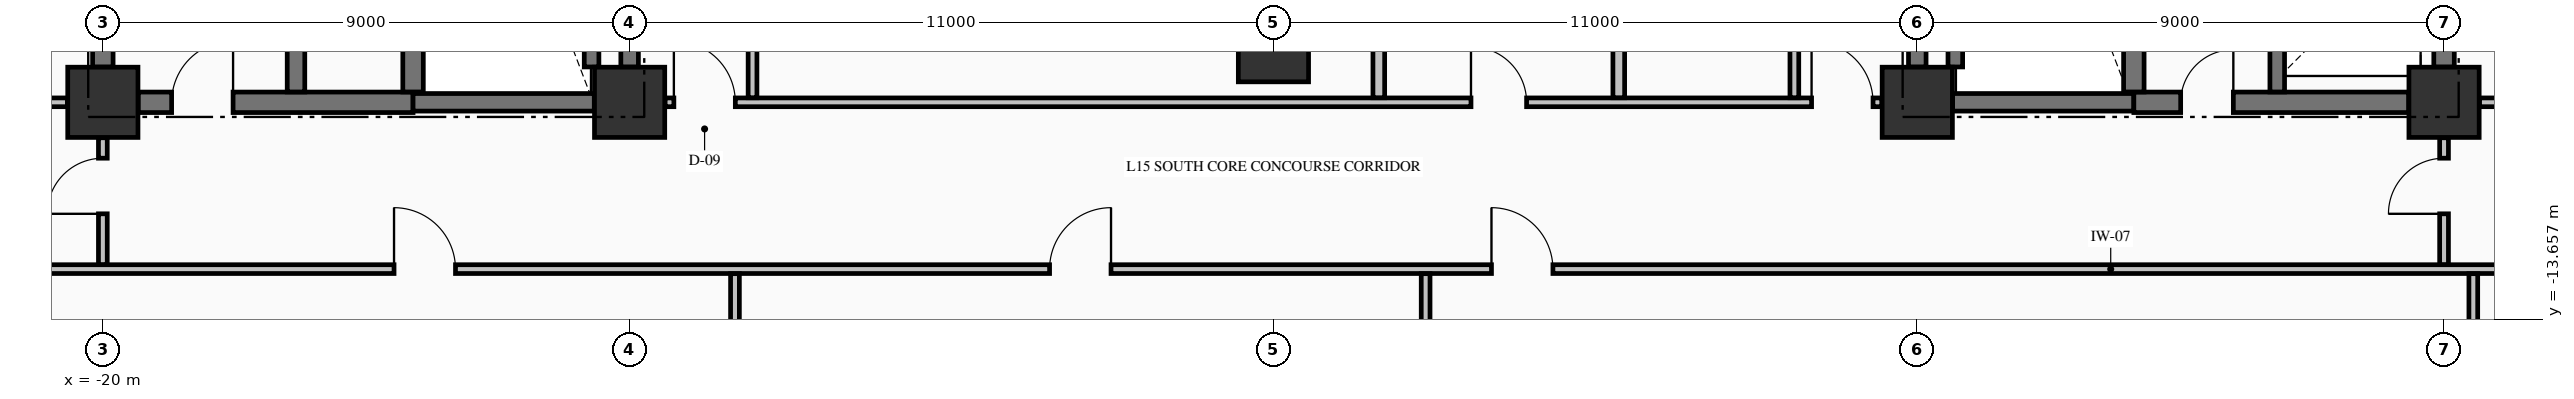
"""IFC4 building model, lengths in metres.
Left out: names, types, materials, properties, quantities, classifications, styles, units other than length and angle.
Written with IfcOpenShell. Run it as: python <this file> out.ifc"""

import sys

from ifc_helpers import new_model, si_unit, direction, frame, frame_2d, origin, origin_2d, place, context, subcontext, project, spatial, rectangle, extrude, element, fill, save


model = new_model("IFC4")
c1 = context("Model", 3, precision=1e-05, world=origin(), true_north=direction((0.0, 1.0)))
c2 = subcontext(c1, "Body", "Model", "MODEL_VIEW")
j1 = project(units=[si_unit("LENGTHUNIT", "METRE"), si_unit("PLANEANGLEUNIT", "RADIAN")], contexts=[c1])
p1 = place(None, origin())
s1 = spatial("IfcSite", under=j1, at=p1, CompositionType="ELEMENT")
p2 = place(p1, origin())
s2 = spatial("IfcBuilding", under=s1, at=p2, CompositionType="ELEMENT")
p3 = place(p2, frame((0.0, 0.0, 64.33)))
s3 = spatial("IfcBuildingStorey", under=s2, at=p3, CompositionType="ELEMENT", Elevation=64.33)
for number, where, z_axis, x_axis in (
    (1, (-20.0, -9.95, -0.25), (0.0, 0.0, 1.0), (1.0, 0.0, 0.0)),
    (2, (-11.0, -9.95, -0.25), (0.0, 0.0, 1.0), (1.0, 0.0, 0.0)),
    (3, (11.0, -9.95, -0.25), (0.0, 0.0, 1.0), (1.0, 0.0, 0.0)),
    (4, (20.0, -9.95, -0.25), (0.0, 0.0, 1.0), (1.0, 0.0, 0.0)),
    (5, (0.0, -9.0, -0.25), (0.0, 0.0, 1.0), (1.0, 0.0, 0.0)),
):
    element("IfcColumn", number, at=place(p3, frame(where, z_axis=z_axis, x_axis=x_axis)), inside=s3, PredefinedType="COLUMN", context=c2, shape_type="SweptSolid", body=[
        extrude(rectangle(XDim=1.2, YDim=1.2, at=origin_2d()), origin(), (0.0, 0.0, 1.0), 3.57),
    ])
p4 = place(p3, frame((-19.396, -9.95, 0.0), z_axis=(0.0, 0.0, 1.0), x_axis=(1.0, 0.0, 0.0)))
e6 = element("IfcWall", 6, at=p4, inside=s3, PredefinedType="SHEAR", context=c2, shape_type="SweptSolid", body=[
    extrude(rectangle(XDim=4.696, YDim=0.35, at=frame_2d((2.348, 0.0))), origin(), (0.0, 0.0, 1.0), 3.32),
])
p5 = place(p4, frame((0.571, 0.0, 0.0)))
e7 = element("IfcOpeningElement", 7, at=p5, cuts=e6, PredefinedType="OPENING", context=c2, shape_type="SweptSolid", body=[
    extrude(rectangle(XDim=1.05, YDim=2.15, at=frame_2d((0.525, 1.075))), frame((0.0, 0.185, 0.0), z_axis=(0.0, -1.0, 0.0), x_axis=(1.0, 0.0, 0.0)), (0.0, 0.0, 1.0), 0.37),
])
for number, where, z_axis, x_axis in (
    (8, (-14.7, -9.95, 0.0), (0.0, 0.0, 1.0), (1.0, 0.0, 0.0)),
    (9, (11.604, -9.95, 0.0), (0.0, 0.0, 1.0), (1.0, 0.0, 0.0)),
):
    element("IfcWall", number, at=place(p3, frame(where, z_axis=z_axis, x_axis=x_axis)), inside=s3, PredefinedType="SHEAR", context=c2, shape_type="SweptSolid", body=[
        extrude(rectangle(XDim=3.096, YDim=0.3, at=frame_2d((1.548, 0.0))), origin(), (0.0, 0.0, 1.0), 3.32),
    ])
p6 = place(p3, frame((14.7, -9.95, 0.0), z_axis=(0.0, 0.0, 1.0), x_axis=(1.0, 0.0, 0.0)))
e10 = element("IfcWall", 10, at=p6, inside=s3, PredefinedType="SHEAR", context=c2, shape_type="SweptSolid", body=[
    extrude(rectangle(XDim=4.696, YDim=0.35, at=frame_2d((2.348, 0.0))), origin(), (0.0, 0.0, 1.0), 3.32),
])
p7 = place(p6, frame((0.8, 0.0, 0.0)))
e11 = element("IfcOpeningElement", 11, at=p7, cuts=e10, PredefinedType="OPENING", context=c2, shape_type="SweptSolid", body=[
    extrude(rectangle(XDim=0.9, YDim=2.15, at=frame_2d((0.45, 1.075))), frame((0.0, 0.185, 0.0), z_axis=(0.0, -1.0, 0.0), x_axis=(1.0, 0.0, 0.0)), (0.0, 0.0, 1.0), 0.37),
])
p8 = place(p3, frame((-28.835, -12.8, 0.0), z_axis=(0.0, 0.0, 1.0), x_axis=(1.0, 0.0, 0.0)))
e12 = element("IfcWall", 12, at=p8, inside=s3, PredefinedType="PARTITIONING", context=c2, shape_type="SweptSolid", body=[
    extrude(rectangle(XDim=52.67, YDim=0.15, at=frame_2d((26.335, 0.0))), origin(), (0.0, 0.0, 1.0), 3.32),
])
p9 = place(p8, frame((13.81, 0.0, 0.0)))
e13 = element("IfcOpeningElement", 13, at=p9, cuts=e12, PredefinedType="OPENING", context=c2, shape_type="SweptSolid", body=[
    extrude(rectangle(XDim=1.05, YDim=2.15, at=frame_2d((0.525, 1.075))), frame((0.0, 0.085, 0.0), z_axis=(0.0, -1.0, 0.0), x_axis=(1.0, 0.0, 0.0)), (0.0, 0.0, 1.0), 0.17),
])
p10 = place(p8, frame((25.01, 0.0, 0.0)))
e14 = element("IfcOpeningElement", 14, at=p10, cuts=e12, PredefinedType="OPENING", context=c2, shape_type="SweptSolid", body=[
    extrude(rectangle(XDim=1.05, YDim=2.15, at=frame_2d((0.525, 1.075))), frame((0.0, 0.085, 0.0), z_axis=(0.0, -1.0, 0.0), x_axis=(1.0, 0.0, 0.0)), (0.0, 0.0, 1.0), 0.17),
])
p11 = place(p8, frame((32.56, 0.0, 0.0)))
e15 = element("IfcOpeningElement", 15, at=p11, cuts=e12, PredefinedType="OPENING", context=c2, shape_type="SweptSolid", body=[
    extrude(rectangle(XDim=1.05, YDim=2.15, at=frame_2d((0.525, 1.075))), frame((0.0, 0.085, 0.0), z_axis=(0.0, -1.0, 0.0), x_axis=(1.0, 0.0, 0.0)), (0.0, 0.0, 1.0), 0.17),
])
p12 = place(p3, frame((-28.835, -9.95, 0.0), z_axis=(0.0, 0.0, 1.0), x_axis=(1.0, 0.0, 0.0)))
e16 = element("IfcWall", 16, at=p12, inside=s3, PredefinedType="PARTITIONING", context=c2, shape_type="SweptSolid", body=[
    extrude(rectangle(XDim=8.229, YDim=0.15, at=frame_2d((4.115, 0.0))), origin(), (0.0, 0.0, 1.0), 3.32),
])
p13 = place(p12, frame((3.86, 0.0, 0.0)))
e17 = element("IfcOpeningElement", 17, at=p13, cuts=e16, PredefinedType="OPENING", context=c2, shape_type="SweptSolid", body=[
    extrude(rectangle(XDim=0.95, YDim=2.15, at=frame_2d((0.475, 1.075))), frame((0.0, 0.085, 0.0), z_axis=(0.0, -1.0, 0.0), x_axis=(1.0, 0.0, 0.0)), (0.0, 0.0, 1.0), 0.17),
])
p14 = place(p3, frame((-10.394, -9.95, 0.0), z_axis=(0.0, 0.0, 1.0), x_axis=(1.0, 0.0, 0.0)))
e18 = element("IfcWall", 18, at=p14, inside=s3, PredefinedType="PARTITIONING", context=c2, shape_type="SweptSolid", body=[
    extrude(rectangle(XDim=20.788, YDim=0.15, at=frame_2d((10.394, 0.0))), origin(), (0.0, 0.0, 1.0), 3.32),
])
p15 = place(p14, frame((0.15, 0.0, 0.0)))
e19 = element("IfcOpeningElement", 19, at=p15, cuts=e18, PredefinedType="OPENING", context=c2, shape_type="SweptSolid", body=[
    extrude(rectangle(XDim=1.05, YDim=2.15, at=frame_2d((0.525, 1.075))), frame((0.0, 0.085, 0.0), z_axis=(0.0, -1.0, 0.0), x_axis=(1.0, 0.0, 0.0)), (0.0, 0.0, 1.0), 0.17),
])
p16 = place(p14, frame((19.588, 0.0, 0.0)))
e20 = element("IfcOpeningElement", 20, at=p16, cuts=e18, PredefinedType="OPENING", context=c2, shape_type="SweptSolid", body=[
    extrude(rectangle(XDim=1.05, YDim=2.15, at=frame_2d((0.525, 1.075))), frame((0.0, 0.085, 0.0), z_axis=(0.0, -1.0, 0.0), x_axis=(1.0, 0.0, 0.0)), (0.0, 0.0, 1.0), 0.17),
])
p17 = place(p14, frame((13.769, 0.0, 0.0)))
e21 = element("IfcOpeningElement", 21, at=p17, cuts=e18, PredefinedType="OPENING", context=c2, shape_type="SweptSolid", body=[
    extrude(rectangle(XDim=0.95, YDim=2.15, at=frame_2d((0.475, 1.075))), frame((0.0, 0.085, 0.0), z_axis=(0.0, -1.0, 0.0), x_axis=(1.0, 0.0, 0.0)), (0.0, 0.0, 1.0), 0.17),
])
p18 = place(p3, frame((20.606, -9.95, 0.0), z_axis=(0.0, 0.0, 1.0), x_axis=(1.0, 0.0, 0.0)))
e22 = element("IfcWall", 22, at=p18, inside=s3, PredefinedType="PARTITIONING", context=c2, shape_type="SweptSolid", body=[
    extrude(rectangle(XDim=3.229, YDim=0.15, at=frame_2d((1.615, 0.0))), origin(), (0.0, 0.0, 1.0), 3.32),
])
p19 = place(p18, frame((0.894, 0.0, 0.0)))
e23 = element("IfcOpeningElement", 23, at=p19, cuts=e22, PredefinedType="OPENING", context=c2, shape_type="SweptSolid", body=[
    extrude(rectangle(XDim=1.0, YDim=2.15, at=frame_2d((0.5, 1.075))), frame((0.0, 0.085, 0.0), z_axis=(0.0, -1.0, 0.0), x_axis=(1.0, 0.0, 0.0)), (0.0, 0.0, 1.0), 0.17),
])
p20 = place(p3, frame((-20.0, -9.346, 0.0), z_axis=(0.0, 0.0, 1.0), x_axis=(0.0, 1.0, 0.0)))
e24 = element("IfcWall", 24, at=p20, inside=s3, PredefinedType="SHEAR", context=c2, shape_type="SweptSolid", body=[
    extrude(rectangle(XDim=8.742, YDim=0.35, at=frame_2d((4.371, 0.0))), origin(), (0.0, 0.0, 1.0), 3.32),
])
p21 = place(p3, frame((-16.7, -9.773, 0.0), z_axis=(0.0, 0.0, 1.0), x_axis=(0.0, 1.0, 0.0)))
e25 = element("IfcWall", 25, at=p21, inside=s3, PredefinedType="SHEAR", context=c2, shape_type="SweptSolid", body=[
    extrude(rectangle(XDim=9.371, YDim=0.3, at=frame_2d((4.686, 0.0))), origin(), (0.0, 0.0, 1.0), 3.32),
])
p22 = place(p3, frame((-14.7, -9.773, 0.0), z_axis=(0.0, 0.0, 1.0), x_axis=(0.0, 1.0, 0.0)))
e26 = element("IfcWall", 26, at=p22, inside=s3, PredefinedType="SHEAR", context=c2, shape_type="SweptSolid", body=[
    extrude(rectangle(XDim=9.371, YDim=0.35, at=frame_2d((4.686, 0.0))), origin(), (0.0, 0.0, 1.0), 3.32),
])
p23 = place(p3, frame((-11.65, -9.346, 0.0), z_axis=(0.0, 0.0, 1.0), x_axis=(0.0, 1.0, 0.0)))
e27 = element("IfcWall", 27, at=p23, inside=s3, PredefinedType="SOLIDWALL", context=c2, shape_type="SweptSolid", body=[
    extrude(rectangle(XDim=8.742, YDim=0.25, at=frame_2d((4.371, 0.0))), origin(), (0.0, 0.0, 1.0), 3.32),
])
for number, where, z_axis, x_axis in (
    (28, (-11.0, -9.346, 0.0), (0.0, 0.0, 1.0), (0.0, 1.0, 0.0)),
    (29, (11.0, -9.346, 0.0), (0.0, 0.0, 1.0), (0.0, 1.0, 0.0)),
):
    element("IfcWall", number, at=place(p3, frame(where, z_axis=z_axis, x_axis=x_axis)), inside=s3, PredefinedType="SHEAR", context=c2, shape_type="SweptSolid", body=[
        extrude(rectangle(XDim=8.742, YDim=0.3, at=frame_2d((4.371, 0.0))), origin(), (0.0, 0.0, 1.0), 3.32),
    ])
p24 = place(p3, frame((11.65, -9.346, 0.0), z_axis=(0.0, 0.0, 1.0), x_axis=(0.0, 1.0, 0.0)))
e30 = element("IfcWall", 30, at=p24, inside=s3, PredefinedType="SOLIDWALL", context=c2, shape_type="SweptSolid", body=[
    extrude(rectangle(XDim=8.742, YDim=0.25, at=frame_2d((4.371, 0.0))), origin(), (0.0, 0.0, 1.0), 3.32),
])
p25 = place(p3, frame((14.7, -9.773, 0.0), z_axis=(0.0, 0.0, 1.0), x_axis=(0.0, 1.0, 0.0)))
e31 = element("IfcWall", 31, at=p25, inside=s3, PredefinedType="SHEAR", context=c2, shape_type="SweptSolid", body=[
    extrude(rectangle(XDim=9.371, YDim=0.35, at=frame_2d((4.686, 0.0))), origin(), (0.0, 0.0, 1.0), 3.32),
])
p26 = place(p3, frame((17.15, -9.773, 0.0), z_axis=(0.0, 0.0, 1.0), x_axis=(0.0, 1.0, 0.0)))
e32 = element("IfcWall", 32, at=p26, inside=s3, PredefinedType="SOLIDWALL", context=c2, shape_type="SweptSolid", body=[
    extrude(rectangle(XDim=2.596, YDim=0.25, at=frame_2d((1.298, 0.0))), origin(), (0.0, 0.0, 1.0), 3.32),
])
p27 = place(p3, frame((20.0, -9.346, 0.0), z_axis=(0.0, 0.0, 1.0), x_axis=(0.0, 1.0, 0.0)))
e33 = element("IfcWall", 33, at=p27, inside=s3, PredefinedType="SHEAR", context=c2, shape_type="SweptSolid", body=[
    extrude(rectangle(XDim=2.169, YDim=0.35, at=frame_2d((1.084, 0.0))), origin(), (0.0, 0.0, 1.0), 3.32),
])
p28 = place(p3, frame((-20.0, -12.722, 0.0), z_axis=(0.0, 0.0, 1.0), x_axis=(0.0, 1.0, 0.0)))
e34 = element("IfcWall", 34, at=p28, inside=s3, PredefinedType="PARTITIONING", context=c2, shape_type="SweptSolid", body=[
    extrude(rectangle(XDim=2.166, YDim=0.15, at=frame_2d((1.083, 0.0))), origin(), (0.0, 0.0, 1.0), 2.66),
])
p29 = place(p28, frame((0.867, 0.0, 0.0)))
e35 = element("IfcOpeningElement", 35, at=p29, cuts=e34, PredefinedType="OPENING", context=c2, shape_type="SweptSolid", body=[
    extrude(rectangle(XDim=0.95, YDim=2.15, at=frame_2d((0.475, 1.075))), frame((0.0, 0.085, 0.0), z_axis=(0.0, -1.0, 0.0), x_axis=(1.0, 0.0, 0.0)), (0.0, 0.0, 1.0), 0.17),
])
p30 = place(p3, frame((-9.2, -26.335, 0.0), z_axis=(0.0, 0.0, 1.0), x_axis=(0.0, 1.0, 0.0)))
e36 = element("IfcWall", 36, at=p30, inside=s3, PredefinedType="PARTITIONING", context=c2, shape_type="SweptSolid", body=[
    extrude(rectangle(XDim=13.457, YDim=0.15, at=frame_2d((6.729, 0.0))), origin(), (0.0, 0.0, 1.0), 3.32),
])
p31 = place(p3, frame((-8.9, -9.872, 0.0), z_axis=(0.0, 0.0, 1.0), x_axis=(0.0, 1.0, 0.0)))
e37 = element("IfcWall", 37, at=p31, inside=s3, PredefinedType="PARTITIONING", context=c2, shape_type="SweptSolid", body=[
    extrude(rectangle(XDim=11.969, YDim=0.15, at=frame_2d((5.984, 0.0))), origin(), (0.0, 0.0, 1.0), 3.32),
])
p32 = place(p31, frame((5.527, 0.0, 0.0)))
e38 = element("IfcOpeningElement", 38, at=p32, cuts=e37, PredefinedType="OPENING", context=c2, shape_type="SweptSolid", body=[
    extrude(rectangle(XDim=0.95, YDim=2.15, at=frame_2d((0.475, 1.075))), frame((0.0, 0.085, 0.0), z_axis=(0.0, -1.0, 0.0), x_axis=(1.0, 0.0, 0.0)), (0.0, 0.0, 1.0), 0.17),
])
p33 = place(p3, frame((1.8, -9.872, 0.0), z_axis=(0.0, 0.0, 1.0), x_axis=(0.0, 1.0, 0.0)))
e39 = element("IfcWall", 39, at=p33, inside=s3, PredefinedType="PARTITIONING", context=c2, shape_type="SweptSolid", body=[
    extrude(rectangle(XDim=4.969, YDim=0.2, at=frame_2d((2.484, 0.0))), origin(), (0.0, 0.0, 1.0), 3.32),
])
p34 = place(p3, frame((2.6, -26.335, 0.0), z_axis=(0.0, 0.0, 1.0), x_axis=(0.0, 1.0, 0.0)))
e40 = element("IfcWall", 40, at=p34, inside=s3, PredefinedType="PARTITIONING", context=c2, shape_type="SweptSolid", body=[
    extrude(rectangle(XDim=13.457, YDim=0.15, at=frame_2d((6.729, 0.0))), origin(), (0.0, 0.0, 1.0), 3.32),
])
p35 = place(p3, frame((5.9, -9.872, 0.0), z_axis=(0.0, 0.0, 1.0), x_axis=(0.0, 1.0, 0.0)))
e41 = element("IfcWall", 41, at=p35, inside=s3, PredefinedType="PARTITIONING", context=c2, shape_type="SweptSolid", body=[
    extrude(rectangle(XDim=4.969, YDim=0.2, at=frame_2d((2.484, 0.0))), origin(), (0.0, 0.0, 1.0), 3.32),
])
p36 = place(p3, frame((8.9, -9.872, 0.0), z_axis=(0.0, 0.0, 1.0), x_axis=(0.0, 1.0, 0.0)))
e42 = element("IfcWall", 42, at=p36, inside=s3, PredefinedType="PARTITIONING", context=c2, shape_type="SweptSolid", body=[
    extrude(rectangle(XDim=4.969, YDim=0.15, at=frame_2d((2.484, 0.0))), origin(), (0.0, 0.0, 1.0), 3.32),
])
p37 = place(p36, frame((1.997, 0.0, 0.0)))
e43 = element("IfcOpeningElement", 43, at=p37, cuts=e42, PredefinedType="OPENING", context=c2, shape_type="SweptSolid", body=[
    extrude(rectangle(XDim=0.95, YDim=2.15, at=frame_2d((0.475, 1.075))), frame((0.0, 0.085, 0.0), z_axis=(0.0, -1.0, 0.0), x_axis=(1.0, 0.0, 0.0)), (0.0, 0.0, 1.0), 0.17),
])
p38 = place(p3, frame((20.0, -12.722, 0.0), z_axis=(0.0, 0.0, 1.0), x_axis=(0.0, 1.0, 0.0)))
e44 = element("IfcWall", 44, at=p38, inside=s3, PredefinedType="PARTITIONING", context=c2, shape_type="SweptSolid", body=[
    extrude(rectangle(XDim=2.166, YDim=0.15, at=frame_2d((1.083, 0.0))), origin(), (0.0, 0.0, 1.0), 3.32),
])
p39 = place(p38, frame((0.867, 0.0, 0.0)))
e45 = element("IfcOpeningElement", 45, at=p39, cuts=e44, PredefinedType="OPENING", context=c2, shape_type="SweptSolid", body=[
    extrude(rectangle(XDim=0.95, YDim=2.15, at=frame_2d((0.475, 1.075))), frame((0.0, 0.085, 0.0), z_axis=(0.0, -1.0, 0.0), x_axis=(1.0, 0.0, 0.0)), (0.0, 0.0, 1.0), 0.17),
])
p40 = place(p3, frame((20.5, -22.294, 0.0), z_axis=(0.0, 0.0, 1.0), x_axis=(0.0, 1.0, 0.0)))
e46 = element("IfcWall", 46, at=p40, inside=s3, PredefinedType="PARTITIONING", context=c2, shape_type="SweptSolid", body=[
    extrude(rectangle(XDim=9.416, YDim=0.15, at=frame_2d((4.708, 0.0))), origin(), (0.0, 0.0, 1.0), 3.32),
])
p41 = place(p5, origin())
e47 = element("IfcDoor", 47, at=p41, inside=s3, OperationType="SINGLE_SWING_RIGHT", PredefinedType="DOOR", context=c2, shape_type="SweptSolid", body=[
    extrude(rectangle(XDim=1.05, YDim=2.15, at=frame_2d((0.525, 1.075))), frame((0.0, 0.025, 0.0), z_axis=(0.0, -1.0, 0.0), x_axis=(1.0, 0.0, 0.0)), (0.0, 0.0, 1.0), 0.05),
])
fill(e7, e47)
p42 = place(p7, origin())
e48 = element("IfcDoor", 48, at=p42, inside=s3, OperationType="SINGLE_SWING_RIGHT", PredefinedType="DOOR", context=c2, shape_type="SweptSolid", body=[
    extrude(rectangle(XDim=0.9, YDim=2.15, at=frame_2d((0.45, 1.075))), frame((0.0, 0.025, 0.0), z_axis=(0.0, -1.0, 0.0), x_axis=(1.0, 0.0, 0.0)), (0.0, 0.0, 1.0), 0.05),
])
fill(e11, e48)
p43 = place(p15, origin())
e49 = element("IfcDoor", 49, at=p43, inside=s3, OperationType="SINGLE_SWING_LEFT", PredefinedType="DOOR", context=c2, shape_type="SweptSolid", body=[
    extrude(rectangle(XDim=1.05, YDim=2.15, at=frame_2d((0.525, 1.075))), frame((0.0, 0.025, 0.0), z_axis=(0.0, -1.0, 0.0), x_axis=(1.0, 0.0, 0.0)), (0.0, 0.0, 1.0), 0.05),
])
fill(e19, e49)
p44 = place(p16, origin())
e50 = element("IfcDoor", 50, at=p44, inside=s3, OperationType="SINGLE_SWING_LEFT", PredefinedType="DOOR", context=c2, shape_type="SweptSolid", body=[
    extrude(rectangle(XDim=1.05, YDim=2.15, at=frame_2d((0.525, 1.075))), frame((0.0, 0.025, 0.0), z_axis=(0.0, -1.0, 0.0), x_axis=(1.0, 0.0, 0.0)), (0.0, 0.0, 1.0), 0.05),
])
fill(e20, e50)
p45 = place(p9, origin())
e51 = element("IfcDoor", 51, at=p45, inside=s3, OperationType="SINGLE_SWING_LEFT", PredefinedType="DOOR", context=c2, shape_type="SweptSolid", body=[
    extrude(rectangle(XDim=1.05, YDim=2.15, at=frame_2d((0.525, 1.075))), frame((0.0, 0.025, 0.0), z_axis=(0.0, -1.0, 0.0), x_axis=(1.0, 0.0, 0.0)), (0.0, 0.0, 1.0), 0.05),
])
fill(e13, e51)
p46 = place(p10, origin())
e52 = element("IfcDoor", 52, at=p46, inside=s3, OperationType="SINGLE_SWING_RIGHT", PredefinedType="DOOR", context=c2, shape_type="SweptSolid", body=[
    extrude(rectangle(XDim=1.05, YDim=2.15, at=frame_2d((0.525, 1.075))), frame((0.0, 0.025, 0.0), z_axis=(0.0, -1.0, 0.0), x_axis=(1.0, 0.0, 0.0)), (0.0, 0.0, 1.0), 0.05),
])
fill(e14, e52)
p47 = place(p11, origin())
e53 = element("IfcDoor", 53, at=p47, inside=s3, OperationType="SINGLE_SWING_LEFT", PredefinedType="DOOR", context=c2, shape_type="SweptSolid", body=[
    extrude(rectangle(XDim=1.05, YDim=2.15, at=frame_2d((0.525, 1.075))), frame((0.0, 0.025, 0.0), z_axis=(0.0, -1.0, 0.0), x_axis=(1.0, 0.0, 0.0)), (0.0, 0.0, 1.0), 0.05),
])
fill(e15, e53)
p48 = place(p17, origin())
e54 = element("IfcDoor", 54, at=p48, inside=s3, OperationType="SINGLE_SWING_LEFT", PredefinedType="DOOR", context=c2, shape_type="SweptSolid", body=[
    extrude(rectangle(XDim=0.95, YDim=2.15, at=frame_2d((0.475, 1.075))), frame((0.0, 0.025, 0.0), z_axis=(0.0, -1.0, 0.0), x_axis=(1.0, 0.0, 0.0)), (0.0, 0.0, 1.0), 0.05),
])
fill(e21, e54)
p49 = place(p29, origin())
e55 = element("IfcDoor", 55, at=p49, inside=s3, OperationType="SINGLE_SWING_LEFT", PredefinedType="DOOR", context=c2, shape_type="SweptSolid", body=[
    extrude(rectangle(XDim=0.95, YDim=2.15, at=frame_2d((0.475, 1.075))), frame((0.0, 0.025, 0.0), z_axis=(0.0, -1.0, 0.0), x_axis=(1.0, 0.0, 0.0)), (0.0, 0.0, 1.0), 0.05),
])
fill(e35, e55)
p50 = place(p39, origin())
e56 = element("IfcDoor", 56, at=p50, inside=s3, OperationType="SINGLE_SWING_LEFT", PredefinedType="DOOR", context=c2, shape_type="SweptSolid", body=[
    extrude(rectangle(XDim=0.95, YDim=2.15, at=frame_2d((0.475, 1.075))), frame((0.0, 0.025, 0.0), z_axis=(0.0, -1.0, 0.0), x_axis=(1.0, 0.0, 0.0)), (0.0, 0.0, 1.0), 0.05),
])
fill(e45, e56)
save(model, sys.argv[1])
